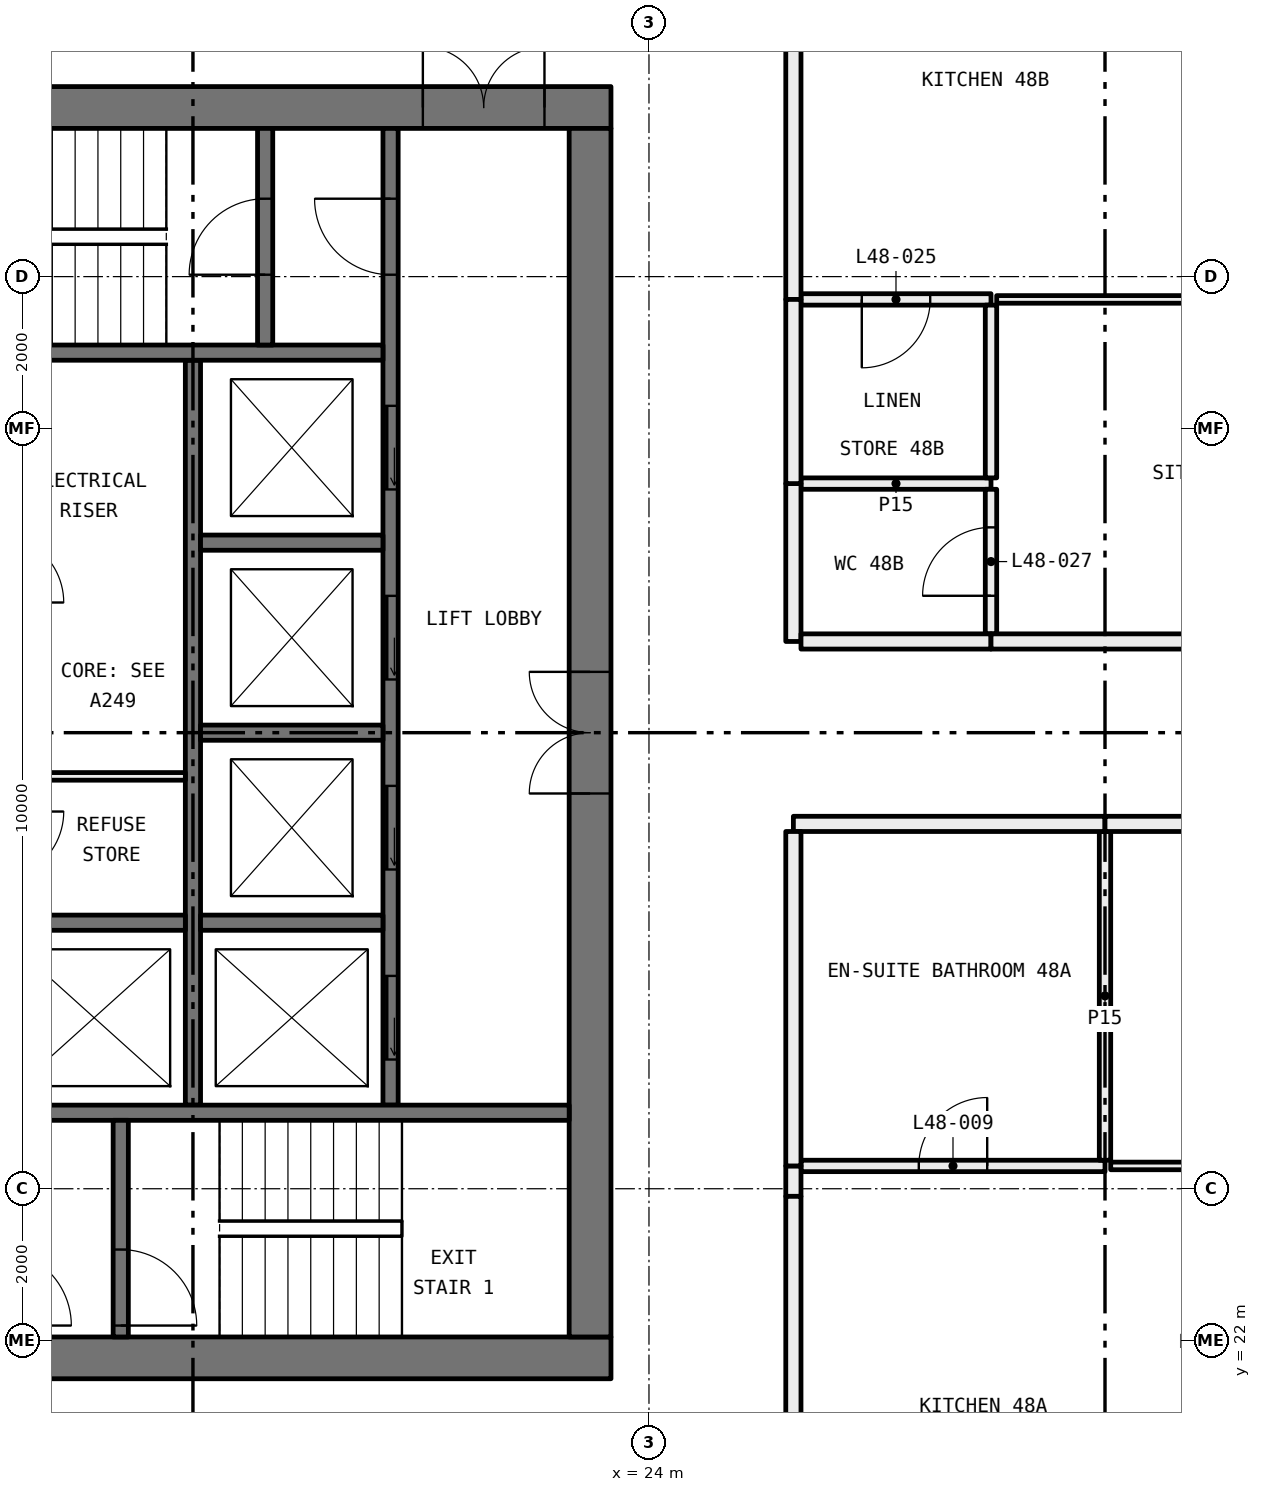
"""IFC4 building model, lengths in metres.
Left out: names, types, materials, properties, quantities, classifications, styles, units other than length and angle.
Written with IfcOpenShell. Run it as: python <this file> out.ifc"""

import sys

from ifc_helpers import new_model, si_unit, direction, frame, frame_2d, origin, place, context, subcontext, project, spatial, rectangle, extrude, element, fill, save


model = new_model("IFC4")
c1 = context("Model", 3, precision=1e-05, world=origin(), true_north=direction((0.0, 1.0)))
c2 = subcontext(c1, "Body", "Model", "MODEL_VIEW")
j1 = project(units=[si_unit("LENGTHUNIT", "METRE"), si_unit("PLANEANGLEUNIT", "RADIAN")], contexts=[c1])
p1 = place(None, origin())
s1 = spatial("IfcSite", under=j1, at=p1, CompositionType="ELEMENT")
p2 = place(p1, origin())
s2 = spatial("IfcBuilding", under=s1, at=p2, CompositionType="ELEMENT")
p3 = place(p2, frame((0.0, 0.0, 182.4)))
s3 = spatial("IfcBuildingStorey", under=s2, at=p3, CompositionType="ELEMENT", Elevation=182.4)
p4 = place(p3, frame((30.0, 24.3, 0.0), z_axis=(0.0, 0.0, 1.0), x_axis=(-1.0, 0.0, 0.0)))
e1 = element("IfcWall", 1, at=p4, inside=s3, PredefinedType="PARTITIONING", context=c2, shape_type="SweptSolid", body=[
    extrude(rectangle(XDim=4.0, YDim=0.15, at=frame_2d((2.0, 0.0))), origin(), (0.0, 0.0, 1.0), 3.05),
])
p5 = place(p4, frame((1.55, 0.0, 0.0)))
e2 = element("IfcOpeningElement", 2, at=p5, cuts=e1, PredefinedType="OPENING", context=c2, shape_type="SweptSolid", body=[
    extrude(rectangle(XDim=0.9, YDim=2.1, at=frame_2d((0.45, 1.05))), frame((0.0, 0.085, 0.0), z_axis=(0.0, -1.0, 0.0), x_axis=(1.0, 0.0, 0.0)), (0.0, 0.0, 1.0), 0.17),
])
p6 = place(p3, frame((31.45, 24.3, 0.0), z_axis=(0.0, 0.0, 1.0), x_axis=(-1.0, 0.0, 0.0)))
e3 = element("IfcWall", 3, at=p6, inside=s3, PredefinedType="PARTITIONING", context=c2, shape_type="SweptSolid", body=[
    extrude(rectangle(XDim=1.375, YDim=0.1, at=frame_2d((0.688, 0.0))), origin(), (0.0, 0.0, 1.0), 3.05),
])
p7 = place(p3, frame((25.9, 24.3, 0.0), z_axis=(0.0, 0.0, 1.0), x_axis=(0.0, -1.0, 0.0)))
e4 = element("IfcWall", 4, at=p7, inside=s3, PredefinedType="PARTITIONING", context=c2, shape_type="SweptSolid", body=[
    extrude(rectangle(XDim=0.4, YDim=0.2, at=frame_2d((0.2, 0.0))), origin(), (0.0, 0.0, 1.0), 2.45),
])
p8 = place(p3, frame((25.9, 23.9, 0.0), z_axis=(0.0, 0.0, 1.0), x_axis=(0.0, -1.0, 0.0)))
e5 = element("IfcWall", 5, at=p8, inside=s3, PredefinedType="PARTITIONING", context=c2, shape_type="SweptSolid", body=[
    extrude(rectangle(XDim=5.8, YDim=0.2, at=frame_2d((2.9, 0.0))), origin(), (0.0, 0.0, 1.0), 3.05),
])
p9 = place(p3, frame((30.0, 24.375, 0.0), z_axis=(0.0, 0.0, 1.0), x_axis=(0.0, 1.0, 0.0)))
e6 = element("IfcWall", 6, at=p9, inside=s3, PredefinedType="PARTITIONING", context=c2, shape_type="SweptSolid", body=[
    extrude(rectangle(XDim=4.325, YDim=0.15, at=frame_2d((2.163, 0.0))), origin(), (0.0, 0.0, 1.0), 3.05),
])
p10 = place(p3, frame((30.0, 28.8, 0.0), z_axis=(0.0, 0.0, 1.0), x_axis=(-1.0, 0.0, 0.0)))
e7 = element("IfcWall", 7, at=p10, inside=s3, PredefinedType="PARTITIONING", context=c2, shape_type="SweptSolid", body=[
    extrude(rectangle(XDim=4.1, YDim=0.2, at=frame_2d((2.05, 0.0))), origin(), (0.0, 0.0, 1.0), 3.05),
])
p11 = place(p3, frame((25.9, 28.7, 0.0), z_axis=(0.0, 0.0, 1.0), x_axis=(0.0, -1.0, 0.0)))
e8 = element("IfcWall", 8, at=p11, inside=s3, PredefinedType="PARTITIONING", context=c2, shape_type="SweptSolid", body=[
    extrude(rectangle(XDim=4.4, YDim=0.2, at=frame_2d((2.2, 0.0))), origin(), (0.0, 0.0, 1.0), 3.05),
])
p12 = place(p3, frame((35.9, 28.8, 0.0), z_axis=(0.0, 0.0, 1.0), x_axis=(-1.0, 0.0, 0.0)))
e9 = element("IfcWall", 9, at=p12, inside=s3, PredefinedType="PARTITIONING", context=c2, shape_type="SweptSolid", body=[
    extrude(rectangle(XDim=5.9, YDim=0.2, at=frame_2d((2.95, 0.0))), origin(), (0.0, 0.0, 1.0), 3.05),
])
p13 = place(p3, frame((26.0, 35.7, 0.0), z_axis=(0.0, 0.0, 1.0), x_axis=(1.0, 0.0, 0.0)))
e10 = element("IfcWall", 10, at=p13, inside=s3, PredefinedType="PARTITIONING", context=c2, shape_type="SweptSolid", body=[
    extrude(rectangle(XDim=2.5, YDim=0.15, at=frame_2d((1.25, 0.0))), origin(), (0.0, 0.0, 1.0), 3.05),
])
p14 = place(p13, frame((0.8, 0.0, 0.0)))
e11 = element("IfcOpeningElement", 11, at=p14, cuts=e10, PredefinedType="OPENING", context=c2, shape_type="SweptSolid", body=[
    extrude(rectangle(XDim=0.9, YDim=2.1, at=frame_2d((0.45, 1.05))), frame((0.0, 0.085, 0.0), z_axis=(0.0, -1.0, 0.0), x_axis=(1.0, 0.0, 0.0)), (0.0, 0.0, 1.0), 0.17),
])
p15 = place(p3, frame((28.575, 35.7, 0.0), z_axis=(0.0, 0.0, 1.0), x_axis=(1.0, 0.0, 0.0)))
e12 = element("IfcWall", 12, at=p15, inside=s3, PredefinedType="PARTITIONING", context=c2, shape_type="SweptSolid", body=[
    extrude(rectangle(XDim=2.875, YDim=0.1, at=frame_2d((1.438, 0.0))), origin(), (0.0, 0.0, 1.0), 3.05),
])
p16 = place(p3, frame((25.9, 41.9, 0.0), z_axis=(0.0, 0.0, 1.0), x_axis=(0.0, -1.0, 0.0)))
e13 = element("IfcWall", 13, at=p16, inside=s3, PredefinedType="PARTITIONING", context=c2, shape_type="SweptSolid", body=[
    extrude(rectangle(XDim=6.2, YDim=0.2, at=frame_2d((3.1, 0.0))), origin(), (0.0, 0.0, 1.0), 2.45),
])
p17 = place(p3, frame((28.5, 33.277, 0.0), z_axis=(0.0, 0.0, 1.0), x_axis=(-1.0, 0.0, 0.0)))
e14 = element("IfcWall", 14, at=p17, inside=s3, PredefinedType="PARTITIONING", context=c2, shape_type="SweptSolid", body=[
    extrude(rectangle(XDim=2.5, YDim=0.15, at=frame_2d((1.25, 0.0))), origin(), (0.0, 0.0, 1.0), 3.05),
])
p18 = place(p3, frame((28.5, 31.3, 0.0), z_axis=(0.0, 0.0, 1.0), x_axis=(0.0, 1.0, 0.0)))
e15 = element("IfcWall", 15, at=p18, inside=s3, PredefinedType="PARTITIONING", context=c2, shape_type="SweptSolid", body=[
    extrude(rectangle(XDim=1.902, YDim=0.15, at=frame_2d((0.951, 0.0))), origin(), (0.0, 0.0, 1.0), 3.05),
])
p19 = place(p18, frame((0.501, 0.0, 0.0)))
e16 = element("IfcOpeningElement", 16, at=p19, cuts=e15, PredefinedType="OPENING", context=c2, shape_type="SweptSolid", body=[
    extrude(rectangle(XDim=0.9, YDim=2.1, at=frame_2d((0.45, 1.05))), frame((0.0, 0.085, 0.0), z_axis=(0.0, -1.0, 0.0), x_axis=(1.0, 0.0, 0.0)), (0.0, 0.0, 1.0), 0.17),
])
p20 = place(p3, frame((25.9, 33.277, 0.0), z_axis=(0.0, 0.0, 1.0), x_axis=(0.0, -1.0, 0.0)))
e17 = element("IfcWall", 17, at=p20, inside=s3, PredefinedType="PARTITIONING", context=c2, shape_type="SweptSolid", body=[
    extrude(rectangle(XDim=2.077, YDim=0.2, at=frame_2d((1.039, 0.0))), origin(), (0.0, 0.0, 1.0), 3.05),
])
p21 = place(p3, frame((26.0, 31.2, 0.0), z_axis=(0.0, 0.0, 1.0), x_axis=(1.0, 0.0, 0.0)))
e18 = element("IfcWall", 18, at=p21, inside=s3, PredefinedType="PARTITIONING", context=c2, shape_type="SweptSolid", body=[
    extrude(rectangle(XDim=2.5, YDim=0.2, at=frame_2d((1.25, 0.0))), origin(), (0.0, 0.0, 1.0), 3.05),
])
p22 = place(p3, frame((28.5, 33.352, 0.0), z_axis=(0.0, 0.0, 1.0), x_axis=(0.0, 1.0, 0.0)))
e19 = element("IfcWall", 19, at=p22, inside=s3, PredefinedType="PARTITIONING", context=c2, shape_type="SweptSolid", body=[
    extrude(rectangle(XDim=2.273, YDim=0.15, at=frame_2d((1.136, 0.0))), origin(), (0.0, 0.0, 1.0), 3.05),
])
p23 = place(p3, frame((25.9, 35.7, 0.0), z_axis=(0.0, 0.0, 1.0), x_axis=(0.0, -1.0, 0.0)))
e20 = element("IfcWall", 20, at=p23, inside=s3, PredefinedType="PARTITIONING", context=c2, shape_type="SweptSolid", body=[
    extrude(rectangle(XDim=2.423, YDim=0.2, at=frame_2d((1.211, 0.0))), origin(), (0.0, 0.0, 1.0), 3.05),
])
p24 = place(p3, frame((28.5, 31.2, 0.0), z_axis=(0.0, 0.0, 1.0), x_axis=(1.0, 0.0, 0.0)))
e21 = element("IfcWall", 21, at=p24, inside=s3, PredefinedType="PARTITIONING", context=c2, shape_type="SweptSolid", body=[
    extrude(rectangle(XDim=7.6, YDim=0.2, at=frame_2d((3.8, 0.0))), origin(), (0.0, 0.0, 1.0), 2.45),
])
p25 = place(p3, frame((12.5, 21.775, 0.0), z_axis=(0.0, 0.0, 1.0), x_axis=(1.0, 0.0, 0.0)))
e22 = element("IfcWall", 22, at=p25, inside=s3, PredefinedType="SHEAR", context=c2, shape_type="SweptSolid", body=[
    extrude(rectangle(XDim=11.0, YDim=0.55, at=frame_2d((5.5, 0.0))), origin(), (0.0, 0.0, 1.0), 3.05),
])
p26 = place(p3, frame((12.5, 38.225, 0.0), z_axis=(0.0, 0.0, 1.0), x_axis=(1.0, 0.0, 0.0)))
e23 = element("IfcWall", 23, at=p26, inside=s3, PredefinedType="SHEAR", context=c2, shape_type="SweptSolid", body=[
    extrude(rectangle(XDim=11.0, YDim=0.55, at=frame_2d((5.5, 0.0))), origin(), (0.0, 0.0, 1.0), 3.05),
])
p27 = place(p26, frame((8.525, 0.0, 0.0)))
e24 = element("IfcOpeningElement", 24, at=p27, cuts=e23, PredefinedType="OPENING", context=c2, shape_type="SweptSolid", body=[
    extrude(rectangle(XDim=1.6, YDim=2.1, at=frame_2d((0.8, 1.05))), frame((0.0, 0.285, 0.0), z_axis=(0.0, -1.0, 0.0), x_axis=(1.0, 0.0, 0.0)), (0.0, 0.0, 1.0), 0.57),
])
p28 = place(p3, frame((23.225, 22.05, 0.0), z_axis=(0.0, 0.0, 1.0), x_axis=(0.0, 1.0, 0.0)))
e25 = element("IfcWall", 25, at=p28, inside=s3, PredefinedType="SHEAR", context=c2, shape_type="SweptSolid", body=[
    extrude(rectangle(XDim=15.9, YDim=0.55, at=frame_2d((7.95, 0.0))), origin(), (0.0, 0.0, 1.0), 3.05),
])
p29 = place(p28, frame((7.15, 0.0, 0.0)))
e26 = element("IfcOpeningElement", 26, at=p29, cuts=e25, PredefinedType="OPENING", context=c2, shape_type="SweptSolid", body=[
    extrude(rectangle(XDim=1.6, YDim=2.1, at=frame_2d((0.8, 1.05))), frame((0.0, 0.285, 0.0), z_axis=(0.0, -1.0, 0.0), x_axis=(1.0, 0.0, 0.0)), (0.0, 0.0, 1.0), 0.57),
])
p30 = place(p3, frame((20.6, 25.1, 0.0), z_axis=(0.0, 0.0, 1.0), x_axis=(0.0, 1.0, 0.0)))
e27 = element("IfcWall", 27, at=p30, inside=s3, PredefinedType="SOLIDWALL", context=c2, shape_type="SweptSolid", body=[
    extrude(rectangle(XDim=12.85, YDim=0.2, at=frame_2d((6.425, 0.0))), origin(), (0.0, 0.0, 1.0), 3.05),
])
p31 = place(p30, frame((0.6, 0.0, 0.0)))
e28 = element("IfcOpeningElement", 28, at=p31, cuts=e27, PredefinedType="OPENING", context=c2, shape_type="SweptSolid", body=[
    extrude(rectangle(XDim=1.1, YDim=2.1, at=frame_2d((0.55, 1.05))), frame((0.0, 0.11, 0.0), z_axis=(0.0, -1.0, 0.0), x_axis=(1.0, 0.0, 0.0)), (0.0, 0.0, 1.0), 0.22),
])
p32 = place(p30, frame((3.1, 0.0, 0.0)))
e29 = element("IfcOpeningElement", 29, at=p32, cuts=e27, PredefinedType="OPENING", context=c2, shape_type="SweptSolid", body=[
    extrude(rectangle(XDim=1.1, YDim=2.1, at=frame_2d((0.55, 1.05))), frame((0.0, 0.11, 0.0), z_axis=(0.0, -1.0, 0.0), x_axis=(1.0, 0.0, 0.0)), (0.0, 0.0, 1.0), 0.22),
])
p33 = place(p30, frame((5.6, 0.0, 0.0)))
e30 = element("IfcOpeningElement", 30, at=p33, cuts=e27, PredefinedType="OPENING", context=c2, shape_type="SweptSolid", body=[
    extrude(rectangle(XDim=1.1, YDim=2.1, at=frame_2d((0.55, 1.05))), frame((0.0, 0.11, 0.0), z_axis=(0.0, -1.0, 0.0), x_axis=(1.0, 0.0, 0.0)), (0.0, 0.0, 1.0), 0.22),
])
p34 = place(p30, frame((8.1, 0.0, 0.0)))
e31 = element("IfcOpeningElement", 31, at=p34, cuts=e27, PredefinedType="OPENING", context=c2, shape_type="SweptSolid", body=[
    extrude(rectangle(XDim=1.1, YDim=2.1, at=frame_2d((0.55, 1.05))), frame((0.0, 0.11, 0.0), z_axis=(0.0, -1.0, 0.0), x_axis=(1.0, 0.0, 0.0)), (0.0, 0.0, 1.0), 0.22),
])
p35 = place(p30, frame((10.925, 0.0, 0.0)))
e32 = element("IfcOpeningElement", 32, at=p35, cuts=e27, PredefinedType="OPENING", context=c2, shape_type="SweptSolid", body=[
    extrude(rectangle(XDim=1.0, YDim=2.1, at=frame_2d((0.5, 1.05))), frame((0.0, 0.11, 0.0), z_axis=(0.0, -1.0, 0.0), x_axis=(1.0, 0.0, 0.0)), (0.0, 0.0, 1.0), 0.22),
])
p36 = place(p3, frame((18.0, 25.1, 0.0), z_axis=(0.0, 0.0, 1.0), x_axis=(0.0, 1.0, 0.0)))
e33 = element("IfcWall", 33, at=p36, inside=s3, PredefinedType="SOLIDWALL", context=c2, shape_type="SweptSolid", body=[
    extrude(rectangle(XDim=9.8, YDim=0.2, at=frame_2d((4.9, 0.0))), origin(), (0.0, 0.0, 1.0), 3.05),
])
for number, where, z_axis, x_axis in (
    (34, (15.5, 25.0, 0.0), (0.0, 0.0, 1.0), (1.0, 0.0, 0.0)),
    (35, (13.05, 35.0, 0.0), (0.0, 0.0, 1.0), (1.0, 0.0, 0.0)),
):
    element("IfcWall", number, at=place(p3, frame(where, z_axis=z_axis, x_axis=x_axis)), inside=s3, PredefinedType="SOLIDWALL", context=c2, shape_type="SweptSolid", body=[
        extrude(rectangle(XDim=7.45, YDim=0.2, at=frame_2d((3.725, 0.0))), origin(), (0.0, 0.0, 1.0), 3.05),
    ])
p37 = place(p3, frame((17.05, 22.05, 0.0), z_axis=(0.0, 0.0, 1.0), x_axis=(0.0, 1.0, 0.0)))
e36 = element("IfcWall", 36, at=p37, inside=s3, PredefinedType="SOLIDWALL", context=c2, shape_type="SweptSolid", body=[
    extrude(rectangle(XDim=2.85, YDim=0.2, at=frame_2d((1.425, 0.0))), origin(), (0.0, 0.0, 1.0), 3.05),
])
p38 = place(p37, frame((0.15, 0.0, 0.0)))
e37 = element("IfcOpeningElement", 37, at=p38, cuts=e36, PredefinedType="OPENING", context=c2, shape_type="SweptSolid", body=[
    extrude(rectangle(XDim=1.0, YDim=2.1, at=frame_2d((0.5, 1.05))), frame((0.0, 0.11, 0.0), z_axis=(0.0, -1.0, 0.0), x_axis=(1.0, 0.0, 0.0)), (0.0, 0.0, 1.0), 0.22),
])
p39 = place(p3, frame((18.95, 35.1, 0.0), z_axis=(0.0, 0.0, 1.0), x_axis=(0.0, 1.0, 0.0)))
e38 = element("IfcWall", 38, at=p39, inside=s3, PredefinedType="SOLIDWALL", context=c2, shape_type="SweptSolid", body=[
    extrude(rectangle(XDim=2.85, YDim=0.2, at=frame_2d((1.425, 0.0))), origin(), (0.0, 0.0, 1.0), 3.05),
])
p40 = place(p39, frame((0.925, 0.0, 0.0)))
e39 = element("IfcOpeningElement", 39, at=p40, cuts=e38, PredefinedType="OPENING", context=c2, shape_type="SweptSolid", body=[
    extrude(rectangle(XDim=1.0, YDim=2.1, at=frame_2d((0.5, 1.05))), frame((0.0, 0.11, 0.0), z_axis=(0.0, -1.0, 0.0), x_axis=(1.0, 0.0, 0.0)), (0.0, 0.0, 1.0), 0.22),
])
for number, where, z_axis, x_axis in (
    (40, (15.5, 27.5, 0.0), (0.0, 0.0, 1.0), (1.0, 0.0, 0.0)),
    (41, (18.1, 27.5, 0.0), (0.0, 0.0, 1.0), (1.0, 0.0, 0.0)),
    (42, (18.1, 30.0, 0.0), (0.0, 0.0, 1.0), (1.0, 0.0, 0.0)),
    (43, (18.1, 32.5, 0.0), (0.0, 0.0, 1.0), (1.0, 0.0, 0.0)),
):
    element("IfcWall", number, at=place(p3, frame(where, z_axis=z_axis, x_axis=x_axis)), inside=s3, PredefinedType="SOLIDWALL", context=c2, shape_type="SweptSolid", body=[
        extrude(rectangle(XDim=2.4, YDim=0.2, at=frame_2d((1.2, 0.0))), origin(), (0.0, 0.0, 1.0), 3.05),
    ])
p41 = place(p3, frame((15.5, 29.425, 0.0), z_axis=(0.0, 0.0, 1.0), x_axis=(1.0, 0.0, 0.0)))
e44 = element("IfcWall", 44, at=p41, inside=s3, PredefinedType="PARTITIONING", context=c2, shape_type="SweptSolid", body=[
    extrude(rectangle(XDim=2.4, YDim=0.1, at=frame_2d((1.2, 0.0))), origin(), (0.0, 0.0, 1.0), 3.05),
])
p42 = place(p5, frame((0.9, 0.0, 0.0), x_axis=(-1.0, 0.0, 0.0)))
e45 = element("IfcDoor", 45, at=p42, inside=s3, OperationType="SINGLE_SWING_LEFT", PredefinedType="DOOR", context=c2, shape_type="SweptSolid", body=[
    extrude(rectangle(XDim=0.9, YDim=2.1, at=frame_2d((0.45, 1.05))), frame((0.0, 0.025, 0.0), z_axis=(0.0, -1.0, 0.0), x_axis=(1.0, 0.0, 0.0)), (0.0, 0.0, 1.0), 0.05),
])
fill(e2, e45)
p43 = place(p14, frame((0.9, 0.0, 0.0), x_axis=(-1.0, 0.0, 0.0)))
e46 = element("IfcDoor", 46, at=p43, inside=s3, OperationType="SINGLE_SWING_LEFT", PredefinedType="DOOR", context=c2, shape_type="SweptSolid", body=[
    extrude(rectangle(XDim=0.9, YDim=2.1, at=frame_2d((0.45, 1.05))), frame((0.0, 0.025, 0.0), z_axis=(0.0, -1.0, 0.0), x_axis=(1.0, 0.0, 0.0)), (0.0, 0.0, 1.0), 0.05),
])
fill(e11, e46)
p44 = place(p19, origin())
e47 = element("IfcDoor", 47, at=p44, inside=s3, OperationType="SINGLE_SWING_RIGHT", PredefinedType="DOOR", context=c2, shape_type="SweptSolid", body=[
    extrude(rectangle(XDim=0.9, YDim=2.1, at=frame_2d((0.45, 1.05))), frame((0.0, 0.025, 0.0), z_axis=(0.0, -1.0, 0.0), x_axis=(1.0, 0.0, 0.0)), (0.0, 0.0, 1.0), 0.05),
])
fill(e16, e47)
p45 = place(p31, origin())
e48 = element("IfcDoor", 48, at=p45, inside=s3, OperationType="SLIDING_TO_LEFT", PredefinedType="DOOR", context=c2, shape_type="SweptSolid", body=[
    extrude(rectangle(XDim=1.1, YDim=2.1, at=frame_2d((0.55, 1.05))), frame((0.0, 0.025, 0.0), z_axis=(0.0, -1.0, 0.0), x_axis=(1.0, 0.0, 0.0)), (0.0, 0.0, 1.0), 0.05),
])
fill(e28, e48)
p46 = place(p32, origin())
e49 = element("IfcDoor", 49, at=p46, inside=s3, OperationType="SLIDING_TO_LEFT", PredefinedType="DOOR", context=c2, shape_type="SweptSolid", body=[
    extrude(rectangle(XDim=1.1, YDim=2.1, at=frame_2d((0.55, 1.05))), frame((0.0, 0.025, 0.0), z_axis=(0.0, -1.0, 0.0), x_axis=(1.0, 0.0, 0.0)), (0.0, 0.0, 1.0), 0.05),
])
fill(e29, e49)
p47 = place(p33, origin())
e50 = element("IfcDoor", 50, at=p47, inside=s3, OperationType="SLIDING_TO_LEFT", PredefinedType="DOOR", context=c2, shape_type="SweptSolid", body=[
    extrude(rectangle(XDim=1.1, YDim=2.1, at=frame_2d((0.55, 1.05))), frame((0.0, 0.025, 0.0), z_axis=(0.0, -1.0, 0.0), x_axis=(1.0, 0.0, 0.0)), (0.0, 0.0, 1.0), 0.05),
])
fill(e30, e50)
p48 = place(p34, origin())
e51 = element("IfcDoor", 51, at=p48, inside=s3, OperationType="SLIDING_TO_LEFT", PredefinedType="DOOR", context=c2, shape_type="SweptSolid", body=[
    extrude(rectangle(XDim=1.1, YDim=2.1, at=frame_2d((0.55, 1.05))), frame((0.0, 0.025, 0.0), z_axis=(0.0, -1.0, 0.0), x_axis=(1.0, 0.0, 0.0)), (0.0, 0.0, 1.0), 0.05),
])
fill(e31, e51)
p49 = place(p38, frame((1.0, 0.0, 0.0), x_axis=(-1.0, 0.0, 0.0)))
e52 = element("IfcDoor", 52, at=p49, inside=s3, OperationType="SINGLE_SWING_LEFT", PredefinedType="DOOR", context=c2, shape_type="SweptSolid", body=[
    extrude(rectangle(XDim=1.0, YDim=2.1, at=frame_2d((0.5, 1.05))), frame((0.0, 0.025, 0.0), z_axis=(0.0, -1.0, 0.0), x_axis=(1.0, 0.0, 0.0)), (0.0, 0.0, 1.0), 0.05),
])
fill(e37, e52)
p50 = place(p35, origin())
e53 = element("IfcDoor", 53, at=p50, inside=s3, OperationType="SINGLE_SWING_LEFT", PredefinedType="DOOR", context=c2, shape_type="SweptSolid", body=[
    extrude(rectangle(XDim=1.0, YDim=2.1, at=frame_2d((0.5, 1.05))), frame((0.0, 0.025, 0.0), z_axis=(0.0, -1.0, 0.0), x_axis=(1.0, 0.0, 0.0)), (0.0, 0.0, 1.0), 0.05),
])
fill(e32, e53)
p51 = place(p40, origin())
e54 = element("IfcDoor", 54, at=p51, inside=s3, OperationType="SINGLE_SWING_RIGHT", PredefinedType="DOOR", context=c2, shape_type="SweptSolid", body=[
    extrude(rectangle(XDim=1.0, YDim=2.1, at=frame_2d((0.5, 1.05))), frame((0.0, 0.025, 0.0), z_axis=(0.0, -1.0, 0.0), x_axis=(1.0, 0.0, 0.0)), (0.0, 0.0, 1.0), 0.05),
])
fill(e39, e54)
p52 = place(p27, origin())
e55 = element("IfcDoor", 55, at=p52, inside=s3, OperationType="DOUBLE_DOOR_SINGLE_SWING", PredefinedType="DOOR", context=c2, shape_type="SweptSolid", body=[
    extrude(rectangle(XDim=1.6, YDim=2.1, at=frame_2d((0.8, 1.05))), frame((0.0, 0.025, 0.0), z_axis=(0.0, -1.0, 0.0), x_axis=(1.0, 0.0, 0.0)), (0.0, 0.0, 1.0), 0.05),
])
fill(e24, e55)
p53 = place(p29, origin())
e56 = element("IfcDoor", 56, at=p53, inside=s3, OperationType="DOUBLE_DOOR_SINGLE_SWING", PredefinedType="DOOR", context=c2, shape_type="SweptSolid", body=[
    extrude(rectangle(XDim=1.6, YDim=2.1, at=frame_2d((0.8, 1.05))), frame((0.0, 0.025, 0.0), z_axis=(0.0, -1.0, 0.0), x_axis=(1.0, 0.0, 0.0)), (0.0, 0.0, 1.0), 0.05),
])
fill(e26, e56)
save(model, sys.argv[1])
